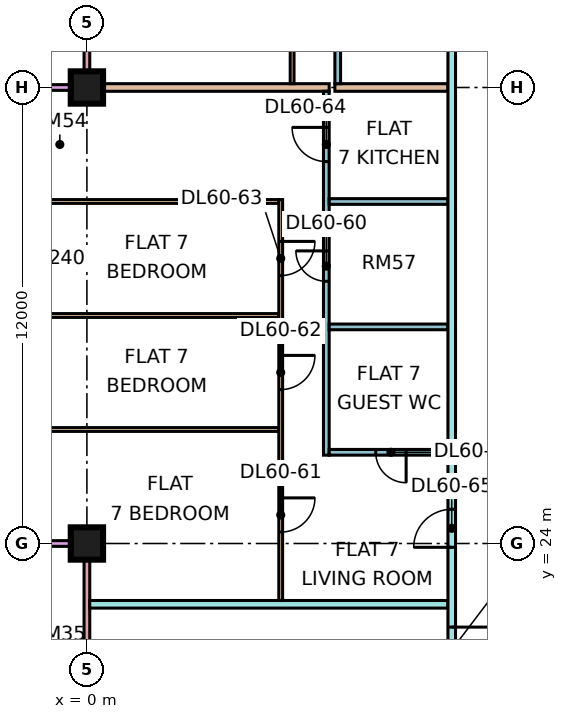
"""IFC4 building model, lengths in metres.
Left out: names, types, materials, properties, quantities, classifications, styles, units other than length and angle.
Written with IfcOpenShell. Run it as: python <this file> out.ifc"""

import sys

from ifc_helpers import new_model, si_unit, direction, frame, frame_2d, origin, origin_2d, place, context, subcontext, project, spatial, rectangle, extrude, element, fill, save


model = new_model("IFC4")
c1 = context("Model", 3, precision=1e-05, world=origin(), true_north=direction((0.0, 1.0)))
c2 = subcontext(c1, "Body", "Model", "MODEL_VIEW")
j1 = project(units=[si_unit("LENGTHUNIT", "METRE"), si_unit("PLANEANGLEUNIT", "RADIAN")], contexts=[c1])
p1 = place(None, origin())
s1 = spatial("IfcSite", under=j1, at=p1, CompositionType="ELEMENT")
p2 = place(p1, origin())
s2 = spatial("IfcBuilding", under=s1, at=p2, CompositionType="ELEMENT")
p3 = place(p2, frame((0.0, 0.0, 252.9)))
s3 = spatial("IfcBuildingStorey", under=s2, at=p3, CompositionType="ELEMENT", Elevation=252.9)
p4 = place(p3, frame((0.0, 24.0, 0.0), z_axis=(0.0, 0.0, 1.0), x_axis=(1.0, 0.0, 0.0)))
e1 = element("IfcColumn", 1, at=p4, inside=s3, PredefinedType="COLUMN", context=c2, shape_type="SweptSolid", body=[
    extrude(rectangle(XDim=0.85, YDim=0.85, at=origin_2d()), origin(), (0.0, 0.0, 1.0), 3.75),
])
p5 = place(p3, frame((0.0, 36.0, 0.0), z_axis=(0.0, 0.0, 1.0), x_axis=(1.0, 0.0, 0.0)))
e2 = element("IfcColumn", 2, at=p5, inside=s3, PredefinedType="COLUMN", context=c2, shape_type="SweptSolid", body=[
    extrude(rectangle(XDim=0.85, YDim=0.85, at=origin_2d()), origin(), (0.0, 0.0, 1.0), 3.75),
])
p6 = place(p3, frame((0.0, 47.925, 0.0), z_axis=(0.0, 0.0, 1.0), x_axis=(0.0, -1.0, 0.0)))
e3 = element("IfcWall", 3, at=p6, inside=s3, PredefinedType="SOLIDWALL", context=c2, shape_type="SweptSolid", body=[
    extrude(rectangle(XDim=11.85, YDim=0.15, at=frame_2d((5.925, 0.0))), origin(), (0.0, 0.0, 1.0), 3.3),
])
p7 = place(p6, frame((0.6, 0.0, 0.45)))
e4 = element("IfcOpeningElement", 4, at=p7, cuts=e3, PredefinedType="OPENING", context=c2, shape_type="SweptSolid", body=[
    extrude(rectangle(XDim=1.2, YDim=2.4, at=frame_2d((0.6, 1.2))), frame((0.0, 0.085, 0.0), z_axis=(0.0, -1.0, 0.0), x_axis=(1.0, 0.0, 0.0)), (0.0, 0.0, 1.0), 0.17),
])
p8 = place(p6, frame((4.087, 0.0, 0.0)))
e5 = element("IfcOpeningElement", 5, at=p8, cuts=e3, PredefinedType="OPENING", context=c2, shape_type="SweptSolid", body=[
    extrude(rectangle(XDim=1.2, YDim=2.4, at=frame_2d((0.6, 1.2))), frame((0.0, 0.085, 0.0), z_axis=(0.0, -1.0, 0.0), x_axis=(1.0, 0.0, 0.0)), (0.0, 0.0, 1.0), 0.17),
])
p9 = place(p6, frame((6.525, 0.0, 0.45)))
e6 = element("IfcOpeningElement", 6, at=p9, cuts=e3, PredefinedType="OPENING", context=c2, shape_type="SweptSolid", body=[
    extrude(rectangle(XDim=1.8, YDim=2.4, at=frame_2d((0.9, 1.2))), frame((0.0, 0.085, 0.0), z_axis=(0.0, -1.0, 0.0), x_axis=(1.0, 0.0, 0.0)), (0.0, 0.0, 1.0), 0.17),
])
p10 = place(p6, frame((9.562, 0.0, 0.45)))
e7 = element("IfcOpeningElement", 7, at=p10, cuts=e3, PredefinedType="OPENING", context=c2, shape_type="SweptSolid", body=[
    extrude(rectangle(XDim=1.2, YDim=2.4, at=frame_2d((0.6, 1.2))), frame((0.0, 0.085, 0.0), z_axis=(0.0, -1.0, 0.0), x_axis=(1.0, 0.0, 0.0)), (0.0, 0.0, 1.0), 0.17),
])
p11 = place(p3, frame((-1.5, 36.0, 0.0), z_axis=(0.0, 0.0, 1.0), x_axis=(1.0, 0.0, 0.0)))
e8 = element("IfcWall", 8, at=p11, inside=s3, PredefinedType="SOLIDWALL", context=c2, shape_type="SweptSolid", body=[
    extrude(rectangle(XDim=1.5, YDim=0.15, at=frame_2d((0.75, 0.0))), origin(), (0.0, 0.0, 1.0), 3.3),
])
p12 = place(p3, frame((0.0, 23.925, 0.0), z_axis=(0.0, 0.0, 1.0), x_axis=(0.0, -1.0, 0.0)))
e9 = element("IfcWall", 9, at=p12, inside=s3, PredefinedType="SOLIDWALL", context=c2, shape_type="SweptSolid", body=[
    extrude(rectangle(XDim=11.35, YDim=0.15, at=frame_2d((5.675, 0.0))), origin(), (0.0, 0.0, 1.0), 3.3),
])
p13 = place(p12, frame((6.738, 0.0, 0.0)))
e10 = element("IfcOpeningElement", 10, at=p13, cuts=e9, PredefinedType="OPENING", context=c2, shape_type="SweptSolid", body=[
    extrude(rectangle(XDim=1.8, YDim=2.4, at=frame_2d((0.9, 1.2))), frame((0.0, 0.085, 0.0), z_axis=(0.0, -1.0, 0.0), x_axis=(1.0, 0.0, 0.0)), (0.0, 0.0, 1.0), 0.17),
])
p14 = place(p3, frame((-1.5, 24.0, 0.0), z_axis=(0.0, 0.0, 1.0), x_axis=(1.0, 0.0, 0.0)))
e11 = element("IfcWall", 11, at=p14, inside=s3, PredefinedType="SOLIDWALL", context=c2, shape_type="SweptSolid", body=[
    extrude(rectangle(XDim=1.5, YDim=0.15, at=frame_2d((0.75, 0.0))), origin(), (0.0, 0.0, 1.0), 3.3),
])
for number, where, z_axis, x_axis in (
    (12, (-1.351, 27.0, 0.0), (0.0, 0.0, 1.0), (1.0, 0.0, 0.0)),
    (13, (-1.351, 30.0, 0.0), (0.0, 0.0, 1.0), (1.0, 0.0, 0.0)),
):
    element("IfcWall", number, at=place(p3, frame(where, z_axis=z_axis, x_axis=x_axis)), inside=s3, PredefinedType="PARTITIONING", context=c2, shape_type="SweptSolid", body=[
        extrude(rectangle(XDim=6.401, YDim=0.1, at=frame_2d((3.201, 0.0))), origin(), (0.0, 0.0, 1.0), 3.3),
    ])
p15 = place(p3, frame((-1.35, 33.0, 0.0), z_axis=(0.0, 0.0, 1.0), x_axis=(1.0, 0.0, 0.0)))
e14 = element("IfcWall", 14, at=p15, inside=s3, PredefinedType="PARTITIONING", context=c2, shape_type="SweptSolid", body=[
    extrude(rectangle(XDim=6.4, YDim=0.1, at=frame_2d((3.2, 0.0))), origin(), (0.0, 0.0, 1.0), 3.3),
])
e15 = element("IfcWall", 15, at=p5, inside=s3, PredefinedType="PARTITIONING", context=c2, shape_type="SweptSolid", body=[
    extrude(rectangle(XDim=6.375, YDim=0.2, at=frame_2d((3.188, 0.0))), origin(), (0.0, 0.0, 1.0), 3.3),
])
p16 = place(p3, frame((0.074, 22.4, 0.0), z_axis=(0.0, 0.0, 1.0), x_axis=(1.0, 0.0, 0.0)))
e16 = element("IfcWall", 16, at=p16, inside=s3, PredefinedType="PARTITIONING", context=c2, shape_type="SweptSolid", body=[
    extrude(rectangle(XDim=9.426, YDim=0.2, at=frame_2d((4.713, 0.0))), origin(), (0.0, 0.0, 1.0), 3.3),
])
p17 = place(p3, frame((5.1, 22.5, 0.0), z_axis=(0.0, 0.0, 1.0), x_axis=(0.0, 1.0, 0.0)))
e17 = element("IfcWall", 17, at=p17, inside=s3, PredefinedType="PARTITIONING", context=c2, shape_type="SweptSolid", body=[
    extrude(rectangle(XDim=10.55, YDim=0.1, at=frame_2d((5.275, 0.0))), origin(), (0.0, 0.0, 1.0), 3.3),
])
p18 = place(p17, frame((1.8, 0.0, 0.0)))
e18 = element("IfcOpeningElement", 18, at=p18, cuts=e17, PredefinedType="OPENING", context=c2, shape_type="SweptSolid", body=[
    extrude(rectangle(XDim=0.9, YDim=2.1, at=frame_2d((0.45, 1.05))), frame((0.0, 0.06, 0.0), z_axis=(0.0, -1.0, 0.0), x_axis=(1.0, 0.0, 0.0)), (0.0, 0.0, 1.0), 0.12),
])
p19 = place(p17, frame((5.55, 0.0, 0.0)))
e19 = element("IfcOpeningElement", 19, at=p19, cuts=e17, PredefinedType="OPENING", context=c2, shape_type="SweptSolid", body=[
    extrude(rectangle(XDim=0.9, YDim=2.1, at=frame_2d((0.45, 1.05))), frame((0.0, 0.06, 0.0), z_axis=(0.0, -1.0, 0.0), x_axis=(1.0, 0.0, 0.0)), (0.0, 0.0, 1.0), 0.12),
])
p20 = place(p17, frame((8.55, 0.0, 0.0)))
e20 = element("IfcOpeningElement", 20, at=p20, cuts=e17, PredefinedType="OPENING", context=c2, shape_type="SweptSolid", body=[
    extrude(rectangle(XDim=0.9, YDim=2.1, at=frame_2d((0.45, 1.05))), frame((0.0, 0.06, 0.0), z_axis=(0.0, -1.0, 0.0), x_axis=(1.0, 0.0, 0.0)), (0.0, 0.0, 1.0), 0.12),
])
p21 = place(p3, frame((5.4, 36.1, 0.0), z_axis=(0.0, 0.0, 1.0), x_axis=(0.0, 1.0, 0.0)))
e21 = element("IfcWall", 21, at=p21, inside=s3, PredefinedType="PARTITIONING", context=c2, shape_type="SweptSolid", body=[
    extrude(rectangle(XDim=26.95, YDim=0.1, at=frame_2d((13.475, 0.0))), origin(), (0.0, 0.0, 1.0), 3.3),
])
p22 = place(p21, frame((0.95, 0.0, 0.0)))
e22 = element("IfcOpeningElement", 22, at=p22, cuts=e21, PredefinedType="OPENING", context=c2, shape_type="SweptSolid", body=[
    extrude(rectangle(XDim=0.9, YDim=2.1, at=frame_2d((0.45, 1.05))), frame((0.0, 0.06, 0.0), z_axis=(0.0, -1.0, 0.0), x_axis=(1.0, 0.0, 0.0)), (0.0, 0.0, 1.0), 0.12),
])
p23 = place(p21, frame((3.95, 0.0, 0.0)))
e23 = element("IfcOpeningElement", 23, at=p23, cuts=e21, PredefinedType="OPENING", context=c2, shape_type="SweptSolid", body=[
    extrude(rectangle(XDim=0.9, YDim=2.1, at=frame_2d((0.45, 1.05))), frame((0.0, 0.06, 0.0), z_axis=(0.0, -1.0, 0.0), x_axis=(1.0, 0.0, 0.0)), (0.0, 0.0, 1.0), 0.12),
])
p24 = place(p21, frame((6.95, 0.0, 0.0)))
e24 = element("IfcOpeningElement", 24, at=p24, cuts=e21, PredefinedType="OPENING", context=c2, shape_type="SweptSolid", body=[
    extrude(rectangle(XDim=0.9, YDim=2.1, at=frame_2d((0.45, 1.05))), frame((0.0, 0.06, 0.0), z_axis=(0.0, -1.0, 0.0), x_axis=(1.0, 0.0, 0.0)), (0.0, 0.0, 1.0), 0.12),
])
p25 = place(p21, frame((9.95, 0.0, 0.0)))
e25 = element("IfcOpeningElement", 25, at=p25, cuts=e21, PredefinedType="OPENING", context=c2, shape_type="SweptSolid", body=[
    extrude(rectangle(XDim=0.9, YDim=2.1, at=frame_2d((0.45, 1.05))), frame((0.0, 0.06, 0.0), z_axis=(0.0, -1.0, 0.0), x_axis=(1.0, 0.0, 0.0)), (0.0, 0.0, 1.0), 0.12),
])
p26 = place(p21, frame((21.95, 0.0, 0.0)))
e26 = element("IfcOpeningElement", 26, at=p26, cuts=e21, PredefinedType="OPENING", context=c2, shape_type="SweptSolid", body=[
    extrude(rectangle(XDim=0.9, YDim=2.1, at=frame_2d((0.45, 1.05))), frame((0.0, 0.06, 0.0), z_axis=(0.0, -1.0, 0.0), x_axis=(1.0, 0.0, 0.0)), (0.0, 0.0, 1.0), 0.12),
])
p27 = place(p21, frame((24.95, 0.0, 0.0)))
e27 = element("IfcOpeningElement", 27, at=p27, cuts=e21, PredefinedType="OPENING", context=c2, shape_type="SweptSolid", body=[
    extrude(rectangle(XDim=0.9, YDim=2.1, at=frame_2d((0.45, 1.05))), frame((0.0, 0.06, 0.0), z_axis=(0.0, -1.0, 0.0), x_axis=(1.0, 0.0, 0.0)), (0.0, 0.0, 1.0), 0.12),
])
p28 = place(p21, frame((15.95, 0.0, 0.0)))
e28 = element("IfcOpeningElement", 28, at=p28, cuts=e21, PredefinedType="OPENING", context=c2, shape_type="SweptSolid", body=[
    extrude(rectangle(XDim=0.9, YDim=2.1, at=frame_2d((0.45, 1.05))), frame((0.0, 0.06, 0.0), z_axis=(0.0, -1.0, 0.0), x_axis=(1.0, 0.0, 0.0)), (0.0, 0.0, 1.0), 0.12),
])
p29 = place(p3, frame((6.3, 26.325, 0.0), z_axis=(0.0, 0.0, 1.0), x_axis=(0.0, 1.0, 0.0)))
e29 = element("IfcWall", 29, at=p29, inside=s3, PredefinedType="PARTITIONING", context=c2, shape_type="SweptSolid", body=[
    extrude(rectangle(XDim=9.575, YDim=0.15, at=frame_2d((4.788, 0.0))), origin(), (0.0, 0.0, 1.0), 3.3),
])
p30 = place(p29, frame((4.575, 0.0, 0.0)))
e30 = element("IfcOpeningElement", 30, at=p30, cuts=e29, PredefinedType="OPENING", context=c2, shape_type="SweptSolid", body=[
    extrude(rectangle(XDim=0.8, YDim=2.1, at=frame_2d((0.4, 1.05))), frame((0.0, 0.085, 0.0), z_axis=(0.0, -1.0, 0.0), x_axis=(1.0, 0.0, 0.0)), (0.0, 0.0, 1.0), 0.17),
])
p31 = place(p29, frame((7.725, 0.0, 0.0)))
e31 = element("IfcOpeningElement", 31, at=p31, cuts=e29, PredefinedType="OPENING", context=c2, shape_type="SweptSolid", body=[
    extrude(rectangle(XDim=0.9, YDim=2.1, at=frame_2d((0.45, 1.05))), frame((0.0, 0.085, 0.0), z_axis=(0.0, -1.0, 0.0), x_axis=(1.0, 0.0, 0.0)), (0.0, 0.0, 1.0), 0.17),
])
p32 = place(p3, frame((6.375, 26.4, 0.0), z_axis=(0.0, 0.0, 1.0), x_axis=(1.0, 0.0, 0.0)))
e32 = element("IfcWall", 32, at=p32, inside=s3, PredefinedType="PARTITIONING", context=c2, shape_type="SweptSolid", body=[
    extrude(rectangle(XDim=3.125, YDim=0.15, at=frame_2d((1.562, 0.0))), origin(), (0.0, 0.0, 1.0), 3.3),
])
p33 = place(p32, frame((1.225, 0.0, 0.0)))
e33 = element("IfcOpeningElement", 33, at=p33, cuts=e32, PredefinedType="OPENING", context=c2, shape_type="SweptSolid", body=[
    extrude(rectangle(XDim=0.8, YDim=2.1, at=frame_2d((0.4, 1.05))), frame((0.0, 0.085, 0.0), z_axis=(0.0, -1.0, 0.0), x_axis=(1.0, 0.0, 0.0)), (0.0, 0.0, 1.0), 0.17),
])
for number, where, z_axis, x_axis in (
    (34, (6.375, 29.7, 0.0), (0.0, 0.0, 1.0), (1.0, 0.0, 0.0)),
    (35, (6.375, 33.0, 0.0), (0.0, 0.0, 1.0), (1.0, 0.0, 0.0)),
):
    element("IfcWall", number, at=place(p3, frame(where, z_axis=z_axis, x_axis=x_axis)), inside=s3, PredefinedType="PARTITIONING", context=c2, shape_type="SweptSolid", body=[
        extrude(rectangle(XDim=3.125, YDim=0.15, at=frame_2d((1.562, 0.0))), origin(), (0.0, 0.0, 1.0), 3.3),
    ])
p34 = place(p3, frame((6.525, 36.0, 0.0), z_axis=(0.0, 0.0, 1.0), x_axis=(1.0, 0.0, 0.0)))
e36 = element("IfcWall", 36, at=p34, inside=s3, PredefinedType="PARTITIONING", context=c2, shape_type="SweptSolid", body=[
    extrude(rectangle(XDim=2.975, YDim=0.2, at=frame_2d((1.488, 0.0))), origin(), (0.0, 0.0, 1.0), 3.3),
])
p35 = place(p3, frame((6.6, 36.1, 0.0), z_axis=(0.0, 0.0, 1.0), x_axis=(0.0, 1.0, 0.0)))
e37 = element("IfcWall", 37, at=p35, inside=s3, PredefinedType="PARTITIONING", context=c2, shape_type="SweptSolid", body=[
    extrude(rectangle(XDim=12.275, YDim=0.15, at=frame_2d((6.137, 0.0))), origin(), (0.0, 0.0, 1.0), 3.3),
])
p36 = place(p35, frame((6.95, 0.0, 0.0)))
e38 = element("IfcOpeningElement", 38, at=p36, cuts=e37, PredefinedType="OPENING", context=c2, shape_type="SweptSolid", body=[
    extrude(rectangle(XDim=0.8, YDim=2.1, at=frame_2d((0.4, 1.05))), frame((0.0, 0.085, 0.0), z_axis=(0.0, -1.0, 0.0), x_axis=(1.0, 0.0, 0.0)), (0.0, 0.0, 1.0), 0.17),
])
p37 = place(p35, frame((2.75, 0.0, 0.0)))
e39 = element("IfcOpeningElement", 39, at=p37, cuts=e37, PredefinedType="OPENING", context=c2, shape_type="SweptSolid", body=[
    extrude(rectangle(XDim=0.9, YDim=2.1, at=frame_2d((0.45, 1.05))), frame((0.0, 0.085, 0.0), z_axis=(0.0, -1.0, 0.0), x_axis=(1.0, 0.0, 0.0)), (0.0, 0.0, 1.0), 0.17),
])
p38 = place(p35, frame((9.8, 0.0, 0.0)))
e40 = element("IfcOpeningElement", 40, at=p38, cuts=e37, PredefinedType="OPENING", context=c2, shape_type="SweptSolid", body=[
    extrude(rectangle(XDim=0.8, YDim=2.1, at=frame_2d((0.4, 1.05))), frame((0.0, 0.085, 0.0), z_axis=(0.0, -1.0, 0.0), x_axis=(1.0, 0.0, 0.0)), (0.0, 0.0, 1.0), 0.17),
])
p39 = place(p3, frame((9.6, 20.0, 0.0), z_axis=(0.0, 0.0, 1.0), x_axis=(0.0, 1.0, 0.0)))
e41 = element("IfcWall", 41, at=p39, inside=s3, PredefinedType="PARTITIONING", context=c2, shape_type="SweptSolid", body=[
    extrude(rectangle(XDim=44.35, YDim=0.2, at=frame_2d((22.175, 0.0))), origin(), (0.0, 0.0, 1.0), 3.3),
])
p40 = place(p39, frame((28.8, 0.0, 0.0)))
e42 = element("IfcOpeningElement", 42, at=p40, cuts=e41, PredefinedType="OPENING", context=c2, shape_type="SweptSolid", body=[
    extrude(rectangle(XDim=1.0, YDim=2.1, at=frame_2d((0.5, 1.05))), frame((0.0, 0.11, 0.0), z_axis=(0.0, -1.0, 0.0), x_axis=(1.0, 0.0, 0.0)), (0.0, 0.0, 1.0), 0.22),
])
p41 = place(p39, frame((0.6, 0.0, 0.0)))
e43 = element("IfcOpeningElement", 43, at=p41, cuts=e41, PredefinedType="OPENING", context=c2, shape_type="SweptSolid", body=[
    extrude(rectangle(XDim=1.2, YDim=2.1, at=frame_2d((0.6, 1.05))), frame((0.0, 0.11, 0.0), z_axis=(0.0, -1.0, 0.0), x_axis=(1.0, 0.0, 0.0)), (0.0, 0.0, 1.0), 0.22),
])
p42 = place(p39, frame((3.9, 0.0, 0.0)))
e44 = element("IfcOpeningElement", 44, at=p42, cuts=e41, PredefinedType="OPENING", context=c2, shape_type="SweptSolid", body=[
    extrude(rectangle(XDim=1.0, YDim=2.1, at=frame_2d((0.5, 1.05))), frame((0.0, 0.11, 0.0), z_axis=(0.0, -1.0, 0.0), x_axis=(1.0, 0.0, 0.0)), (0.0, 0.0, 1.0), 0.22),
])
p43 = place(p41, origin())
e45 = element("IfcDoor", 45, at=p43, inside=s3, OperationType="SINGLE_SWING_RIGHT", PredefinedType="DOOR", context=c2, shape_type="SweptSolid", body=[
    extrude(rectangle(XDim=1.2, YDim=2.1, at=frame_2d((0.6, 1.05))), frame((0.0, 0.025, 0.0), z_axis=(0.0, -1.0, 0.0), x_axis=(1.0, 0.0, 0.0)), (0.0, 0.0, 1.0), 0.05),
])
fill(e43, e45)
p44 = place(p30, frame((0.8, 0.0, 0.0), z_axis=(0.0, 0.0, 1.0), x_axis=(-1.0, 0.0, 0.0)))
e46 = element("IfcDoor", 46, at=p44, inside=s3, OperationType="SINGLE_SWING_RIGHT", PredefinedType="DOOR", context=c2, shape_type="SweptSolid", body=[
    extrude(rectangle(XDim=0.8, YDim=2.1, at=frame_2d((0.4, 1.05))), frame((0.0, 0.025, 0.0), z_axis=(0.0, -1.0, 0.0), x_axis=(1.0, 0.0, 0.0)), (0.0, 0.0, 1.0), 0.05),
])
fill(e30, e46)
p45 = place(p18, origin())
e47 = element("IfcDoor", 47, at=p45, inside=s3, OperationType="SINGLE_SWING_RIGHT", PredefinedType="DOOR", context=c2, shape_type="SweptSolid", body=[
    extrude(rectangle(XDim=0.9, YDim=2.1, at=frame_2d((0.45, 1.05))), frame((0.0, 0.025, 0.0), z_axis=(0.0, -1.0, 0.0), x_axis=(1.0, 0.0, 0.0)), (0.0, 0.0, 1.0), 0.05),
])
fill(e18, e47)
p46 = place(p19, origin())
e48 = element("IfcDoor", 48, at=p46, inside=s3, OperationType="SINGLE_SWING_RIGHT", PredefinedType="DOOR", context=c2, shape_type="SweptSolid", body=[
    extrude(rectangle(XDim=0.9, YDim=2.1, at=frame_2d((0.45, 1.05))), frame((0.0, 0.025, 0.0), z_axis=(0.0, -1.0, 0.0), x_axis=(1.0, 0.0, 0.0)), (0.0, 0.0, 1.0), 0.05),
])
fill(e19, e48)
p47 = place(p20, origin())
e49 = element("IfcDoor", 49, at=p47, inside=s3, OperationType="SINGLE_SWING_RIGHT", PredefinedType="DOOR", context=c2, shape_type="SweptSolid", body=[
    extrude(rectangle(XDim=0.9, YDim=2.1, at=frame_2d((0.45, 1.05))), frame((0.0, 0.025, 0.0), z_axis=(0.0, -1.0, 0.0), x_axis=(1.0, 0.0, 0.0)), (0.0, 0.0, 1.0), 0.05),
])
fill(e20, e49)
p48 = place(p31, frame((0.9, 0.0, 0.0), z_axis=(0.0, 0.0, 1.0), x_axis=(-1.0, 0.0, 0.0)))
e50 = element("IfcDoor", 50, at=p48, inside=s3, OperationType="SINGLE_SWING_RIGHT", PredefinedType="DOOR", context=c2, shape_type="SweptSolid", body=[
    extrude(rectangle(XDim=0.9, YDim=2.1, at=frame_2d((0.45, 1.05))), frame((0.0, 0.025, 0.0), z_axis=(0.0, -1.0, 0.0), x_axis=(1.0, 0.0, 0.0)), (0.0, 0.0, 1.0), 0.05),
])
fill(e31, e50)
p49 = place(p42, origin())
e51 = element("IfcDoor", 51, at=p49, inside=s3, OperationType="SINGLE_SWING_LEFT", PredefinedType="DOOR", context=c2, shape_type="SweptSolid", body=[
    extrude(rectangle(XDim=1.0, YDim=2.1, at=frame_2d((0.5, 1.05))), frame((0.0, 0.025, 0.0), z_axis=(0.0, -1.0, 0.0), x_axis=(1.0, 0.0, 0.0)), (0.0, 0.0, 1.0), 0.05),
])
fill(e44, e51)
p50 = place(p33, origin())
e52 = element("IfcDoor", 52, at=p50, inside=s3, OperationType="SINGLE_SWING_RIGHT", PredefinedType="DOOR", context=c2, shape_type="SweptSolid", body=[
    extrude(rectangle(XDim=0.8, YDim=2.1, at=frame_2d((0.4, 1.05))), frame((0.0, 0.025, 0.0), z_axis=(0.0, -1.0, 0.0), x_axis=(1.0, 0.0, 0.0)), (0.0, 0.0, 1.0), 0.05),
])
fill(e33, e52)
save(model, sys.argv[1])
